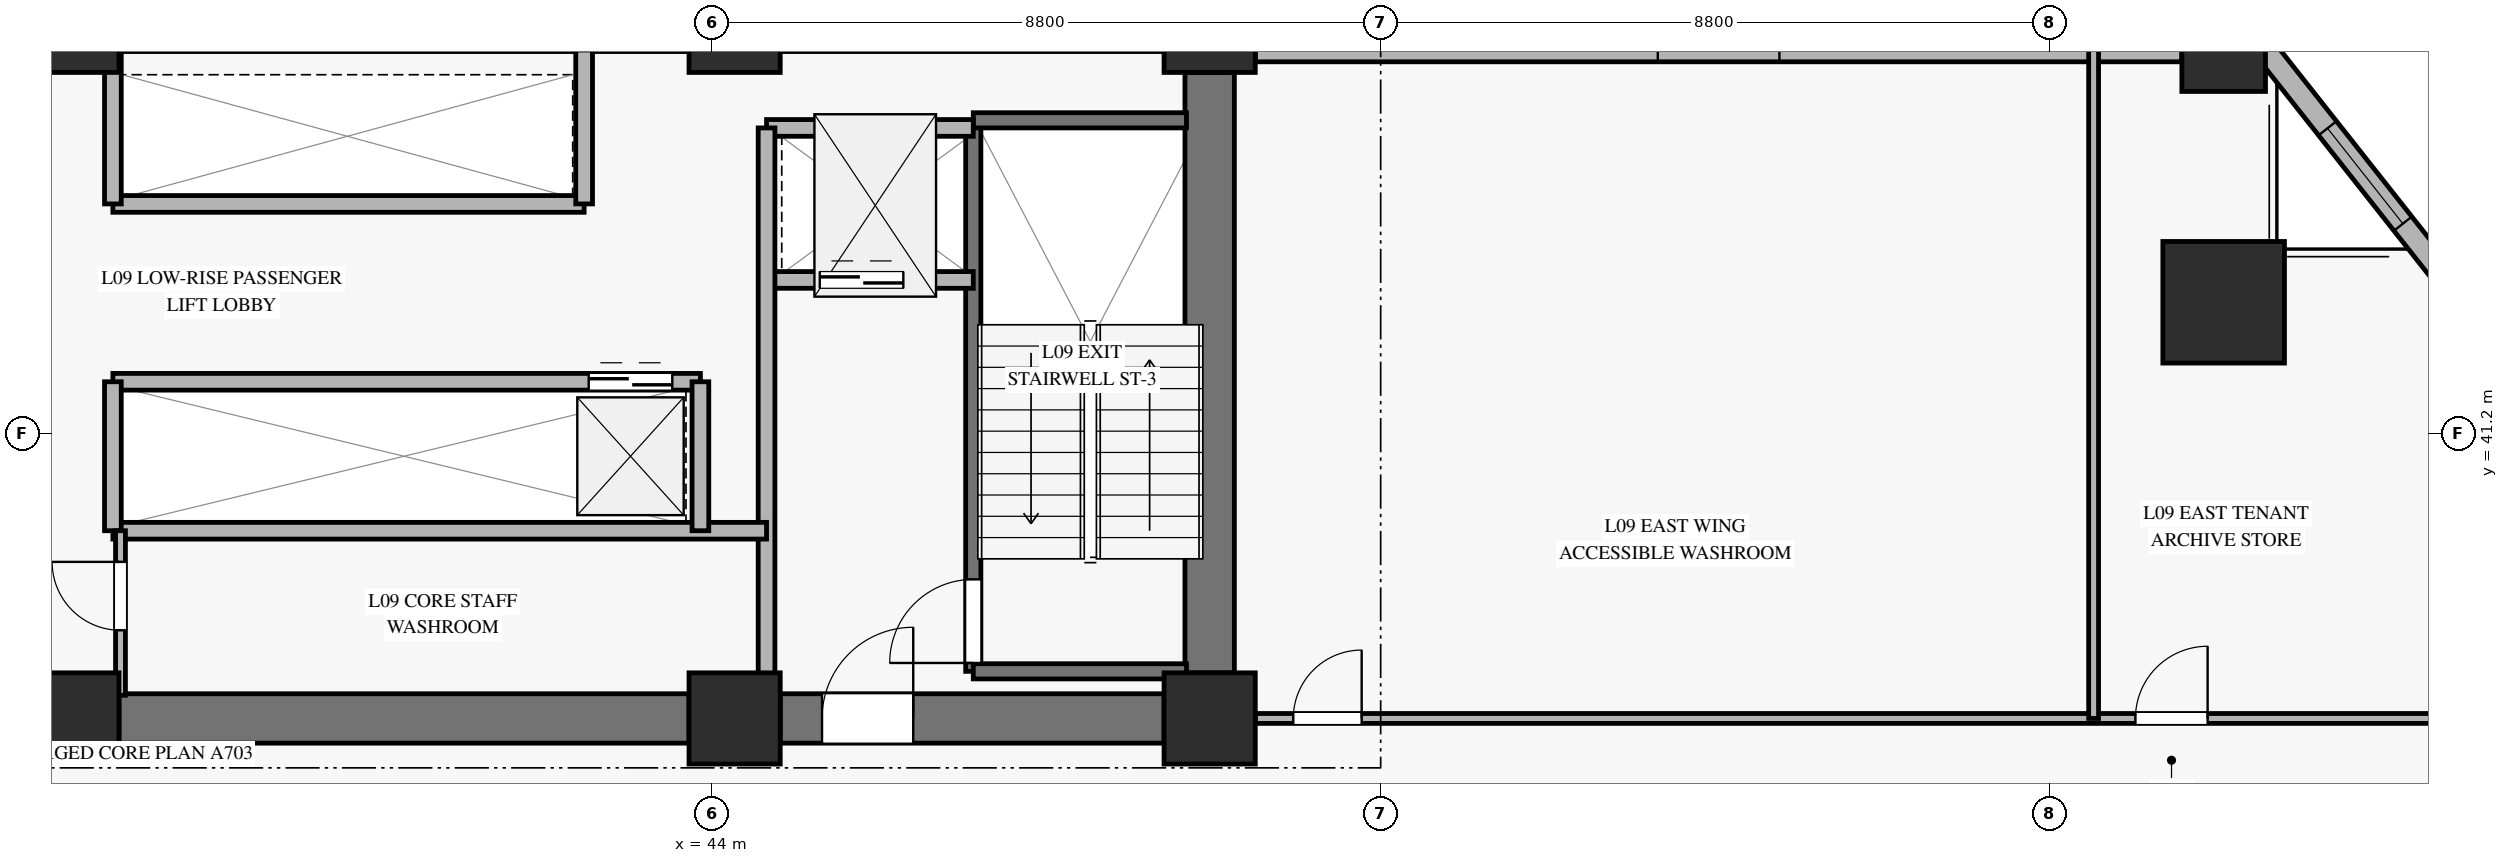
"""IFC4 building model, lengths in metres.
Left out: names, types, materials, properties, quantities, classifications, styles, units other than length and angle.
Written with IfcOpenShell. Run it as: python <this file> out.ifc"""

import sys

from ifc_helpers import new_model, si_unit, direction, frame, frame_2d, origin, origin_2d, place, context, subcontext, project, spatial, rectangle, hollow_rectangle, extrude, source, transform, mapped, element, fill, save


model = new_model("IFC4")
c1 = context("Model", 3, precision=1e-05, world=origin(), true_north=direction((0.0, 1.0)))
c2 = subcontext(c1, "Body", "Model", "MODEL_VIEW")
j1 = project(units=[si_unit("LENGTHUNIT", "METRE"), si_unit("PLANEANGLEUNIT", "RADIAN")], contexts=[c1])
p1 = place(None, origin())
s1 = spatial("IfcSite", under=j1, at=p1, CompositionType="ELEMENT")
p2 = place(p1, origin())
s2 = spatial("IfcBuilding", under=s1, at=p2, CompositionType="ELEMENT")
p3 = place(p2, frame((0.0, 0.0, 37.1)))
s3 = spatial("IfcBuildingStorey", under=s2, at=p3, CompositionType="ELEMENT", Elevation=37.1)
m1 = source(origin(), c2, "Body", "SweptSolid", [
    extrude(rectangle(XDim=1.2, YDim=1.2, at=origin_2d()), origin(), (0.0, 0.0, 1.0), 3.68),
])
for number, where, z_axis, x_axis in (
    (1, (35.6, 37.45, 0.0), (0.0, 0.0, 1.0), (1.0, 0.0, 0.0)),
    (2, (35.6, 46.55, 0.0), (0.0, 0.0, 1.0), (1.0, 0.0, 0.0)),
    (3, (44.3, 37.45, 0.0), (0.0, 0.0, 1.0), (1.0, 0.0, 0.0)),
    (4, (44.3, 46.55, 0.0), (0.0, 0.0, 1.0), (1.0, 0.0, 0.0)),
    (5, (50.55, 37.45, 0.0), (0.0, 0.0, 1.0), (1.0, 0.0, 0.0)),
    (6, (50.55, 46.55, 0.0), (0.0, 0.0, 1.0), (1.0, 0.0, 0.0)),
):
    element("IfcColumn", number, at=place(p3, frame(where, z_axis=z_axis, x_axis=x_axis)), inside=s3, PredefinedType="PILASTER", context=c2, shape_type="MappedRepresentation", body=[
        mapped(m1, transform((0.0, 0.0, 0.0), x_axis=(1.0, 0.0, 0.0), y_axis=(0.0, 1.0, 0.0), z_axis=(0.0, 0.0, 1.0), scale=1.0)),
    ])
p4 = place(p3, frame((36.2, 37.45, 0.0), z_axis=(0.0, 0.0, 1.0), x_axis=(1.0, 0.0, 0.0)))
e7 = element("IfcWall", 7, at=p4, inside=s3, PredefinedType="SHEAR", context=c2, shape_type="SweptSolid", body=[
    extrude(rectangle(XDim=7.5, YDim=0.65, at=frame_2d((3.75, 0.0))), origin(), (0.0, 0.0, 1.0), 3.68),
])
p5 = place(p3, frame((44.9, 37.45, 0.0), z_axis=(0.0, 0.0, 1.0), x_axis=(1.0, 0.0, 0.0)))
e8 = element("IfcWall", 8, at=p5, inside=s3, PredefinedType="SHEAR", context=c2, shape_type="SweptSolid", body=[
    extrude(rectangle(XDim=5.05, YDim=0.65, at=frame_2d((2.525, 0.0))), origin(), (0.0, 0.0, 1.0), 3.68),
])
p6 = place(p5, frame((0.55, 0.0, 0.0)))
e9 = element("IfcOpeningElement", 9, at=p6, cuts=e8, PredefinedType="OPENING", context=c2, shape_type="SweptSolid", body=[
    extrude(rectangle(XDim=1.2, YDim=2.15, at=frame_2d((0.6, 1.075))), frame((0.0, 0.335, 0.0), z_axis=(0.0, -1.0, 0.0), x_axis=(1.0, 0.0, 0.0)), (0.0, 0.0, 1.0), 0.67),
])
p7 = place(p3, frame((50.55, 38.05, 0.0), z_axis=(0.0, 0.0, 1.0), x_axis=(0.0, 1.0, 0.0)))
e10 = element("IfcWall", 10, at=p7, inside=s3, PredefinedType="SHEAR", context=c2, shape_type="SweptSolid", body=[
    extrude(rectangle(XDim=7.9, YDim=0.65, at=frame_2d((3.95, 0.0))), origin(), (0.0, 0.0, 1.0), 3.68),
])
m2 = source(origin(), c2, "Body", "SweptSolid", [
    extrude(hollow_rectangle(XDim=1.6, YDim=1.6, WallThickness=0.075, at=origin_2d()), origin(), (0.0, 0.0, 1.0), 3.68),
])
p8 = place(p3, frame((63.891, 42.926, 0.0), z_axis=(0.0, 0.0, 1.0), x_axis=(1.0, 0.0, 0.0)))
e11 = element("IfcColumn", 11, at=p8, inside=s3, PredefinedType="COLUMN", context=c2, shape_type="MappedRepresentation", body=[
    mapped(m2, transform((0.0, 0.0, 0.0), x_axis=(1.0, 0.0, 0.0), y_axis=(0.0, 1.0, 0.0), z_axis=(0.0, 0.0, 1.0), scale=1.0)),
])
m3 = source(origin(), c2, "Body", "SweptSolid", [
    extrude(hollow_rectangle(XDim=1.1, YDim=1.1, WallThickness=0.05, at=origin_2d()), origin(), (0.0, 0.0, 1.0), 3.68),
])
p9 = place(p3, frame((63.891, 46.25, 0.0), z_axis=(0.0, 0.0, 1.0), x_axis=(1.0, 0.0, 0.0)))
e12 = element("IfcColumn", 12, at=p9, inside=s3, PredefinedType="COLUMN", context=c2, shape_type="MappedRepresentation", body=[
    mapped(m3, transform((0.0, 0.0, 0.0), x_axis=(1.0, 0.0, 0.0), y_axis=(0.0, 1.0, 0.0), z_axis=(0.0, 0.0, 1.0), scale=1.0)),
])
p10 = place(p3, frame((51.15, 46.25, 0.0), z_axis=(0.0, 0.0, 1.0), x_axis=(1.0, 0.0, 0.0)))
e13 = element("IfcWall", 13, at=p10, inside=s3, PredefinedType="SOLIDWALL", context=c2, shape_type="SweptSolid", body=[
    extrude(rectangle(XDim=12.191, YDim=0.32, at=frame_2d((6.096, 0.0))), origin(), (0.0, 0.0, 1.0), 3.16),
])
p11 = place(p10, frame((5.296, 0.0, 0.45)))
e14 = element("IfcOpeningElement", 14, at=p11, cuts=e13, PredefinedType="OPENING", context=c2, shape_type="SweptSolid", body=[
    extrude(rectangle(XDim=1.6, YDim=2.0, at=frame_2d((0.8, 1.0))), frame((0.0, 0.17, 0.0), z_axis=(0.0, -1.0, 0.0), x_axis=(1.0, 0.0, 0.0)), (0.0, 0.0, 1.0), 0.34),
])
p12 = place(p3, frame((67.065, 42.926, 0.0), z_axis=(0.0, 0.0, 1.0), x_axis=(-0.619619988795, 0.784901948963, 0.0)))
e15 = element("IfcWall", 15, at=p12, inside=s3, PredefinedType="SOLIDWALL", context=c2, shape_type="SweptSolid", body=[
    extrude(rectangle(XDim=4.235, YDim=0.3, at=frame_2d((2.117, 0.0))), origin(), (0.0, 0.0, 1.0), 3.16),
])
p13 = place(p12, frame((1.317, 0.0, 0.45)))
e16 = element("IfcOpeningElement", 16, at=p13, cuts=e15, PredefinedType="OPENING", context=c2, shape_type="SweptSolid", body=[
    extrude(rectangle(XDim=1.6, YDim=2.0, at=frame_2d((0.8, 1.0))), frame((0.0, 0.16, 0.0), z_axis=(0.0, -1.0, 0.0), x_axis=(1.0, 0.0, 0.0)), (0.0, 0.0, 1.0), 0.32),
])
p14 = place(p3, frame((47.44, 38.07, 0.0), z_axis=(0.0, 0.0, 1.0), x_axis=(0.0, 1.0, 0.0)))
e17 = element("IfcWall", 17, at=p14, inside=s3, PredefinedType="SOLIDWALL", context=c2, shape_type="SweptSolid", body=[
    extrude(rectangle(XDim=7.25, YDim=0.2, at=frame_2d((3.625, 0.0))), origin(), (0.0, 0.0, 1.0), 3.9),
])
p15 = place(p14, frame((0.11, 0.0, 0.0)))
e18 = element("IfcOpeningElement", 18, at=p15, cuts=e17, PredefinedType="OPENING", context=c2, shape_type="SweptSolid", body=[
    extrude(rectangle(XDim=1.1, YDim=2.15, at=frame_2d((0.55, 1.075))), frame((0.0, 0.11, 0.0), z_axis=(0.0, -1.0, 0.0), x_axis=(1.0, 0.0, 0.0)), (0.0, 0.0, 1.0), 0.22),
])
for number, where, z_axis, x_axis in (
    (19, (47.44, 45.32, 0.0), (0.0, 0.0, 1.0), (1.0, 0.0, 0.0)),
    (20, (47.44, 38.07, 0.0), (0.0, 0.0, 1.0), (1.0, 0.0, 0.0)),
):
    element("IfcWall", number, at=place(p3, frame(where, z_axis=z_axis, x_axis=x_axis)), inside=s3, PredefinedType="SOLIDWALL", context=c2, shape_type="SweptSolid", body=[
        extrude(rectangle(XDim=2.805, YDim=0.2, at=frame_2d((1.403, 0.0))), origin(), (0.0, 0.0, 1.0), 3.9),
    ])
p16 = place(p3, frame((44.72, 43.22, 0.0), z_axis=(0.0, 0.0, 1.0), x_axis=(1.0, 0.0, 0.0)))
e21 = element("IfcWall", 21, at=p16, inside=s3, PredefinedType="SOLIDWALL", context=c2, shape_type="SweptSolid", body=[
    extrude(rectangle(XDim=2.72, YDim=0.22, at=frame_2d((1.36, 0.0))), origin(), (0.0, 0.0, 1.0), 3.68),
])
p17 = place(p16, frame((0.7, 0.0, 0.0)))
e22 = element("IfcOpeningElement", 22, at=p17, cuts=e21, PredefinedType="OPENING", context=c2, shape_type="SweptSolid", body=[
    extrude(rectangle(XDim=1.1, YDim=2.2, at=frame_2d((0.55, 1.1))), frame((0.0, 0.12, 0.0), z_axis=(0.0, -1.0, 0.0), x_axis=(1.0, 0.0, 0.0)), (0.0, 0.0, 1.0), 0.24),
])
p18 = place(p3, frame((44.72, 45.22, 0.0), z_axis=(0.0, 0.0, 1.0), x_axis=(1.0, 0.0, 0.0)))
e23 = element("IfcWall", 23, at=p18, inside=s3, PredefinedType="SOLIDWALL", context=c2, shape_type="SweptSolid", body=[
    extrude(rectangle(XDim=2.72, YDim=0.22, at=frame_2d((1.36, 0.0))), origin(), (0.0, 0.0, 1.0), 3.68),
])
p19 = place(p3, frame((44.72, 37.755, 0.0), z_axis=(0.0, 0.0, 1.0), x_axis=(0.0, 1.0, 0.0)))
e24 = element("IfcWall", 24, at=p19, inside=s3, PredefinedType="SOLIDWALL", context=c2, shape_type="SweptSolid", body=[
    extrude(rectangle(XDim=7.465, YDim=0.22, at=frame_2d((3.732, 0.0))), origin(), (0.0, 0.0, 1.0), 3.68),
])
p20 = place(p3, frame((36.12, 44.22, 0.0), z_axis=(0.0, 0.0, 1.0), x_axis=(1.0, 0.0, 0.0)))
e25 = element("IfcWall", 25, at=p20, inside=s3, PredefinedType="SOLIDWALL", context=c2, shape_type="SweptSolid", body=[
    extrude(rectangle(XDim=6.2, YDim=0.22, at=frame_2d((3.1, 0.0))), origin(), (0.0, 0.0, 1.0), 3.68),
])
for number, where, z_axis, x_axis in (
    (26, (36.12, 44.22, 0.0), (0.0, 0.0, 1.0), (0.0, 1.0, 0.0)),
    (27, (42.32, 44.22, 0.0), (0.0, 0.0, 1.0), (0.0, 1.0, 0.0)),
):
    element("IfcWall", number, at=place(p3, frame(where, z_axis=z_axis, x_axis=x_axis)), inside=s3, PredefinedType="SOLIDWALL", context=c2, shape_type="SweptSolid", body=[
        extrude(rectangle(XDim=2.025, YDim=0.22, at=frame_2d((1.013, 0.0))), origin(), (0.0, 0.0, 1.0), 3.68),
    ])
p21 = place(p3, frame((36.12, 41.88, 0.0), z_axis=(0.0, 0.0, 1.0), x_axis=(1.0, 0.0, 0.0)))
e28 = element("IfcWall", 28, at=p21, inside=s3, PredefinedType="SOLIDWALL", context=c2, shape_type="SweptSolid", body=[
    extrude(rectangle(XDim=7.73, YDim=0.22, at=frame_2d((3.865, 0.0))), origin(), (0.0, 0.0, 1.0), 3.68),
])
p22 = place(p21, frame((6.26, 0.0, 0.0)))
e29 = element("IfcOpeningElement", 29, at=p22, cuts=e28, PredefinedType="OPENING", context=c2, shape_type="SweptSolid", body=[
    extrude(rectangle(XDim=1.1, YDim=2.2, at=frame_2d((0.55, 1.1))), frame((0.0, 0.12, 0.0), z_axis=(0.0, -1.0, 0.0), x_axis=(1.0, 0.0, 0.0)), (0.0, 0.0, 1.0), 0.24),
])
p23 = place(p3, frame((36.12, 39.92, 0.0), z_axis=(0.0, 0.0, 1.0), x_axis=(1.0, 0.0, 0.0)))
e30 = element("IfcWall", 30, at=p23, inside=s3, PredefinedType="SOLIDWALL", context=c2, shape_type="SweptSolid", body=[
    extrude(rectangle(XDim=8.6, YDim=0.22, at=frame_2d((4.3, 0.0))), origin(), (0.0, 0.0, 1.0), 2.965),
])
for number, where, z_axis, x_axis in (
    (31, (36.12, 39.92, 0.0), (0.0, 0.0, 1.0), (0.0, 1.0, 0.0)),
    (32, (43.85, 39.92, 0.0), (0.0, 0.0, 1.0), (0.0, 1.0, 0.0)),
):
    element("IfcWall", number, at=place(p3, frame(where, z_axis=z_axis, x_axis=x_axis)), inside=s3, PredefinedType="SOLIDWALL", context=c2, shape_type="SweptSolid", body=[
        extrude(rectangle(XDim=1.96, YDim=0.22, at=frame_2d((0.98, 0.0))), origin(), (0.0, 0.0, 1.0), 3.68),
    ])
p24 = place(p3, frame((36.22, 37.755, 0.0), z_axis=(0.0, 0.0, 1.0), x_axis=(0.0, 1.0, 0.0)))
e33 = element("IfcWall", 33, at=p24, inside=s3, PredefinedType="PARTITIONING", context=c2, shape_type="SweptSolid", body=[
    extrude(rectangle(XDim=2.165, YDim=0.13, at=frame_2d((1.083, 0.0))), origin(), (0.0, 0.0, 1.0), 3.68),
])
p25 = place(p24, frame((0.855, 0.0, 0.0)))
e34 = element("IfcOpeningElement", 34, at=p25, cuts=e33, PredefinedType="OPENING", context=c2, shape_type="SweptSolid", body=[
    extrude(rectangle(XDim=0.9, YDim=2.1, at=frame_2d((0.45, 1.05))), frame((0.0, 0.075, 0.0), z_axis=(0.0, -1.0, 0.0), x_axis=(1.0, 0.0, 0.0)), (0.0, 0.0, 1.0), 0.15),
])
p26 = place(p3, frame((51.15, 37.45, 0.0), z_axis=(0.0, 0.0, 1.0), x_axis=(1.0, 0.0, 0.0)))
e35 = element("IfcWall", 35, at=p26, inside=s3, PredefinedType="PARTITIONING", context=c2, shape_type="SweptSolid", body=[
    extrude(rectangle(XDim=15.915, YDim=0.13, at=frame_2d((7.958, 0.0))), origin(), (0.0, 0.0, 1.0), 3.165),
])
p27 = place(p26, frame((0.5, 0.0, 0.0)))
e36 = element("IfcOpeningElement", 36, at=p27, cuts=e35, PredefinedType="OPENING", context=c2, shape_type="SweptSolid", body=[
    extrude(rectangle(XDim=0.9, YDim=2.1, at=frame_2d((0.45, 1.05))), frame((0.0, 0.075, 0.0), z_axis=(0.0, -1.0, 0.0), x_axis=(1.0, 0.0, 0.0)), (0.0, 0.0, 1.0), 0.15),
])
p28 = place(p26, frame((11.58, 0.0, 0.0)))
e37 = element("IfcOpeningElement", 37, at=p28, cuts=e35, PredefinedType="OPENING", context=c2, shape_type="SweptSolid", body=[
    extrude(rectangle(XDim=0.95, YDim=2.1, at=frame_2d((0.475, 1.05))), frame((0.0, 0.075, 0.0), z_axis=(0.0, -1.0, 0.0), x_axis=(1.0, 0.0, 0.0)), (0.0, 0.0, 1.0), 0.15),
])
p29 = place(p3, frame((62.18, 37.45, 0.0), z_axis=(0.0, 0.0, 1.0), x_axis=(0.0, 1.0, 0.0)))
e38 = element("IfcWall", 38, at=p29, inside=s3, PredefinedType="PARTITIONING", context=c2, shape_type="SweptSolid", body=[
    extrude(rectangle(XDim=8.8, YDim=0.13, at=frame_2d((4.4, 0.0))), origin(), (0.0, 0.0, 1.0), 3.68),
])
m4 = source(origin(), c2, "Body", "SweptSolid", [
    extrude(rectangle(XDim=1.6, YDim=2.0, at=frame_2d((0.8, 1.0))), frame((0.0, 0.03, 0.0), z_axis=(0.0, -1.0, 0.0), x_axis=(1.0, 0.0, 0.0)), (0.0, 0.0, 1.0), 0.06),
])
p30 = place(p13, origin())
e39 = element("IfcWindow", 39, at=p30, inside=s3, PartitioningType="SINGLE_PANEL", PredefinedType="WINDOW", context=c2, shape_type="MappedRepresentation", body=[
    mapped(m4, transform((0.0, 0.0, 0.0), x_axis=(1.0, 0.0, 0.0), y_axis=(0.0, 1.0, 0.0), z_axis=(0.0, 0.0, 1.0), scale=1.0)),
])
fill(e16, e39)
m5 = source(origin(), c2, "Body", "SweptSolid", [
    extrude(rectangle(XDim=1.1, YDim=2.15, at=frame_2d((0.55, 1.075))), frame((0.0, 0.025, 0.0), z_axis=(0.0, -1.0, 0.0), x_axis=(1.0, 0.0, 0.0)), (0.0, 0.0, 1.0), 0.05),
])
p31 = place(p15, origin())
e40 = element("IfcDoor", 40, at=p31, inside=s3, OperationType="SINGLE_SWING_LEFT", PredefinedType="DOOR", context=c2, shape_type="MappedRepresentation", body=[
    mapped(m5, transform((0.0, 0.0, 0.0), x_axis=(1.0, 0.0, 0.0), y_axis=(0.0, 1.0, 0.0), z_axis=(0.0, 0.0, 1.0), scale=1.0)),
])
fill(e18, e40)
m6 = source(origin(), c2, "Body", "SweptSolid", [
    extrude(rectangle(XDim=1.1, YDim=2.2, at=frame_2d((0.55, 1.1))), frame((0.0, 0.025, 0.0), z_axis=(0.0, -1.0, 0.0), x_axis=(1.0, 0.0, 0.0)), (0.0, 0.0, 1.0), 0.05),
])
p32 = place(p17, origin())
e41 = element("IfcDoor", 41, at=p32, inside=s3, OperationType="SLIDING_TO_LEFT", PredefinedType="DOOR", context=c2, shape_type="MappedRepresentation", body=[
    mapped(m6, transform((0.0, 0.0, 0.0), x_axis=(1.0, 0.0, 0.0), y_axis=(0.0, 1.0, 0.0), z_axis=(0.0, 0.0, 1.0), scale=1.0)),
])
fill(e22, e41)
m7 = source(origin(), c2, "Body", "SweptSolid", [
    extrude(rectangle(XDim=1.2, YDim=2.15, at=frame_2d((0.6, 1.075))), frame((0.0, 0.025, 0.0), z_axis=(0.0, -1.0, 0.0), x_axis=(1.0, 0.0, 0.0)), (0.0, 0.0, 1.0), 0.05),
])
p33 = place(p6, origin())
e42 = element("IfcDoor", 42, at=p33, inside=s3, OperationType="SINGLE_SWING_RIGHT", PredefinedType="DOOR", context=c2, shape_type="MappedRepresentation", body=[
    mapped(m7, transform((0.0, 0.0, 0.0), x_axis=(1.0, 0.0, 0.0), y_axis=(0.0, 1.0, 0.0), z_axis=(0.0, 0.0, 1.0), scale=1.0)),
])
fill(e9, e42)
p34 = place(p22, origin())
e43 = element("IfcDoor", 43, at=p34, inside=s3, OperationType="SLIDING_TO_LEFT", PredefinedType="DOOR", context=c2, shape_type="MappedRepresentation", body=[
    mapped(m6, transform((0.0, 0.0, 0.0), x_axis=(1.0, 0.0, 0.0), y_axis=(0.0, 1.0, 0.0), z_axis=(0.0, 0.0, 1.0), scale=1.0)),
])
fill(e29, e43)
m8 = source(origin(), c2, "Body", "SweptSolid", [
    extrude(rectangle(XDim=0.9, YDim=2.1, at=frame_2d((0.45, 1.05))), frame((0.0, 0.025, 0.0), z_axis=(0.0, -1.0, 0.0), x_axis=(1.0, 0.0, 0.0)), (0.0, 0.0, 1.0), 0.05),
])
p35 = place(p25, origin())
e44 = element("IfcDoor", 44, at=p35, inside=s3, OperationType="SINGLE_SWING_RIGHT", PredefinedType="DOOR", context=c2, shape_type="MappedRepresentation", body=[
    mapped(m8, transform((0.0, 0.0, 0.0), x_axis=(1.0, 0.0, 0.0), y_axis=(0.0, 1.0, 0.0), z_axis=(0.0, 0.0, 1.0), scale=1.0)),
])
fill(e34, e44)
p36 = place(p27, origin())
e45 = element("IfcDoor", 45, at=p36, inside=s3, OperationType="SINGLE_SWING_RIGHT", PredefinedType="DOOR", context=c2, shape_type="MappedRepresentation", body=[
    mapped(m8, transform((0.0, 0.0, 0.0), x_axis=(1.0, 0.0, 0.0), y_axis=(0.0, 1.0, 0.0), z_axis=(0.0, 0.0, 1.0), scale=1.0)),
])
fill(e36, e45)
m9 = source(origin(), c2, "Body", "SweptSolid", [
    extrude(rectangle(XDim=0.95, YDim=2.1, at=frame_2d((0.475, 1.05))), frame((0.0, 0.025, 0.0), z_axis=(0.0, -1.0, 0.0), x_axis=(1.0, 0.0, 0.0)), (0.0, 0.0, 1.0), 0.05),
])
p37 = place(p28, origin())
e46 = element("IfcDoor", 46, at=p37, inside=s3, OperationType="SINGLE_SWING_RIGHT", PredefinedType="DOOR", context=c2, shape_type="MappedRepresentation", body=[
    mapped(m9, transform((0.0, 0.0, 0.0), x_axis=(1.0, 0.0, 0.0), y_axis=(0.0, 1.0, 0.0), z_axis=(0.0, 0.0, 1.0), scale=1.0)),
])
fill(e37, e46)
save(model, sys.argv[1])
